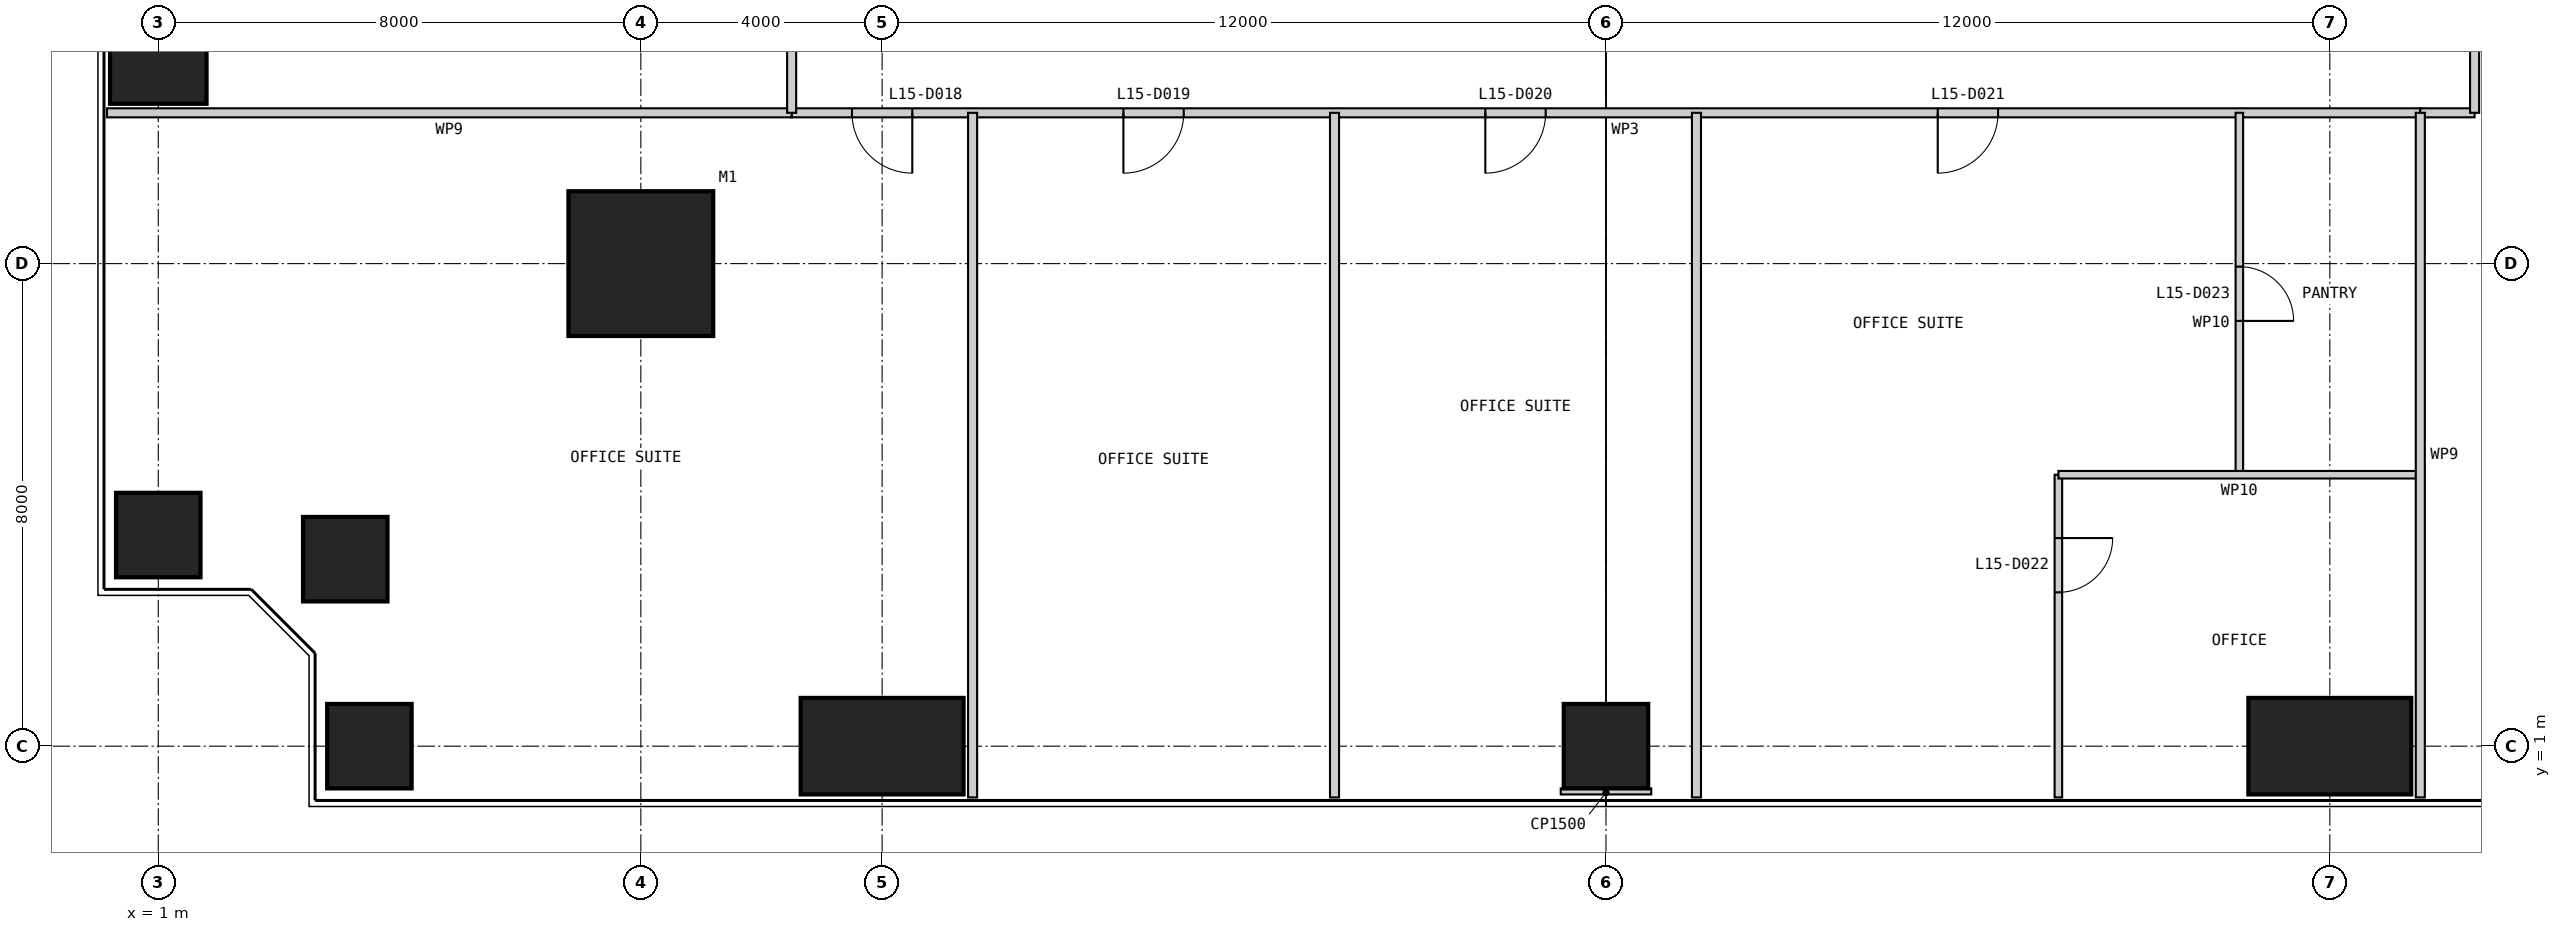
"""IFC4 building model, lengths in metres.
Left out: names, types, materials, properties, quantities, classifications, styles, units other than length and angle.
Written with IfcOpenShell. Run it as: python <this file> out.ifc"""

import sys

from ifc_helpers import new_model, si_unit, direction, frame, frame_2d, origin, origin_2d, place, context, subcontext, project, spatial, rectangle, extrude, element, fill, save


model = new_model("IFC4")
c1 = context("Model", 3, precision=1e-05, world=origin(), true_north=direction((0.0, 1.0)))
c2 = subcontext(c1, "Body", "Model", "MODEL_VIEW")
j1 = project(units=[si_unit("LENGTHUNIT", "METRE"), si_unit("PLANEANGLEUNIT", "RADIAN")], contexts=[c1])
p1 = place(None, origin())
s1 = spatial("IfcSite", under=j1, at=p1, CompositionType="ELEMENT")
p2 = place(p1, origin())
s2 = spatial("IfcBuilding", under=s1, at=p2, CompositionType="ELEMENT")
p3 = place(p2, frame((0.0, 0.0, 67.0)))
s3 = spatial("IfcBuildingStorey", under=s2, at=p3, CompositionType="ELEMENT", Elevation=67.0)
p4 = place(p3, frame((9.0, 9.0, 0.0), z_axis=(0.0, 0.0, 1.0), x_axis=(1.0, 0.0, 0.0)))
e1 = element("IfcColumn", 1, at=p4, inside=s3, PredefinedType="COLUMN", context=c2, shape_type="SweptSolid", body=[
    extrude(rectangle(XDim=2.4, YDim=2.4, at=origin_2d()), origin(), (0.0, 0.0, 1.0), 4.0),
])
p5 = place(p3, frame((4.5, 1.0, 0.0), z_axis=(0.0, 0.0, 1.0), x_axis=(1.0, 0.0, 0.0)))
e2 = element("IfcColumn", 2, at=p5, inside=s3, PredefinedType="COLUMN", context=c2, shape_type="SweptSolid", body=[
    extrude(rectangle(XDim=1.4, YDim=1.4, at=origin_2d()), origin(), (0.0, 0.0, 1.0), 4.0),
])
p6 = place(p3, frame((13.0, 1.0, 0.0), z_axis=(0.0, 0.0, 1.0), x_axis=(1.0, 0.0, 0.0)))
e3 = element("IfcColumn", 3, at=p6, inside=s3, PredefinedType="COLUMN", context=c2, shape_type="SweptSolid", body=[
    extrude(rectangle(XDim=2.7, YDim=1.6, at=origin_2d()), origin(), (0.0, 0.0, 1.0), 4.0),
])
p7 = place(p3, frame((25.0, 1.0, 0.0), z_axis=(0.0, 0.0, 1.0), x_axis=(1.0, 0.0, 0.0)))
e4 = element("IfcColumn", 4, at=p7, inside=s3, PredefinedType="COLUMN", context=c2, shape_type="SweptSolid", body=[
    extrude(rectangle(XDim=1.4, YDim=1.4, at=origin_2d()), origin(), (0.0, 0.0, 1.0), 4.0),
])
p8 = place(p3, frame((37.0, 1.0, 0.0), z_axis=(0.0, 0.0, 1.0), x_axis=(1.0, 0.0, 0.0)))
e5 = element("IfcColumn", 5, at=p8, inside=s3, PredefinedType="COLUMN", context=c2, shape_type="SweptSolid", body=[
    extrude(rectangle(XDim=2.7, YDim=1.6, at=origin_2d()), origin(), (0.0, 0.0, 1.0), 4.0),
])
p9 = place(p3, frame((1.0, 13.0, 0.0), z_axis=(0.0, 0.0, 1.0), x_axis=(1.0, 0.0, 0.0)))
e6 = element("IfcColumn", 6, at=p9, inside=s3, PredefinedType="COLUMN", context=c2, shape_type="SweptSolid", body=[
    extrude(rectangle(XDim=1.6, YDim=2.7, at=origin_2d()), origin(), (0.0, 0.0, 1.0), 4.0),
])
for number, where, z_axis, x_axis in (
    (7, (1.0, 4.5, 0.0), (0.0, 0.0, 1.0), (1.0, 0.0, 0.0)),
    (8, (4.1, 4.1, 0.0), (0.0, 0.0, 1.0), (1.0, 0.0, 0.0)),
):
    element("IfcColumn", number, at=place(p3, frame(where, z_axis=z_axis, x_axis=x_axis)), inside=s3, PredefinedType="COLUMN", context=c2, shape_type="SweptSolid", body=[
        extrude(rectangle(XDim=1.4, YDim=1.4, at=origin_2d()), origin(), (0.0, 0.0, 1.0), 4.0),
    ])
p10 = place(p3, frame((11.5, 11.5, 0.0), z_axis=(0.0, 0.0, 1.0), x_axis=(1.0, 0.0, 0.0)))
e9 = element("IfcWall", 9, at=p10, inside=s3, PredefinedType="PARTITIONING", context=c2, shape_type="SweptSolid", body=[
    extrude(rectangle(XDim=27.0, YDim=0.15, at=frame_2d((13.5, 0.0))), origin(), (0.0, 0.0, 1.0), 3.85),
])
p11 = place(p10, frame((1.0, 0.0, 0.0)))
e10 = element("IfcOpeningElement", 10, at=p11, cuts=e9, PredefinedType="OPENING", context=c2, shape_type="SweptSolid", body=[
    extrude(rectangle(XDim=1.0, YDim=2.2, at=frame_2d((0.5, 1.1))), frame((0.0, 0.085, 0.0), z_axis=(0.0, -1.0, 0.0), x_axis=(1.0, 0.0, 0.0)), (0.0, 0.0, 1.0), 0.17),
])
p12 = place(p10, frame((5.5, 0.0, 0.0)))
e11 = element("IfcOpeningElement", 11, at=p12, cuts=e9, PredefinedType="OPENING", context=c2, shape_type="SweptSolid", body=[
    extrude(rectangle(XDim=1.0, YDim=2.2, at=frame_2d((0.5, 1.1))), frame((0.0, 0.085, 0.0), z_axis=(0.0, -1.0, 0.0), x_axis=(1.0, 0.0, 0.0)), (0.0, 0.0, 1.0), 0.17),
])
p13 = place(p10, frame((11.5, 0.0, 0.0)))
e12 = element("IfcOpeningElement", 12, at=p13, cuts=e9, PredefinedType="OPENING", context=c2, shape_type="SweptSolid", body=[
    extrude(rectangle(XDim=1.0, YDim=2.2, at=frame_2d((0.5, 1.1))), frame((0.0, 0.085, 0.0), z_axis=(0.0, -1.0, 0.0), x_axis=(1.0, 0.0, 0.0)), (0.0, 0.0, 1.0), 0.17),
])
p14 = place(p10, frame((19.0, 0.0, 0.0)))
e13 = element("IfcOpeningElement", 13, at=p14, cuts=e9, PredefinedType="OPENING", context=c2, shape_type="SweptSolid", body=[
    extrude(rectangle(XDim=1.0, YDim=2.2, at=frame_2d((0.5, 1.1))), frame((0.0, 0.085, 0.0), z_axis=(0.0, -1.0, 0.0), x_axis=(1.0, 0.0, 0.0)), (0.0, 0.0, 1.0), 0.17),
])
for number, where, z_axis, x_axis in (
    (14, (0.15, 11.5, 0.0), (0.0, 0.0, 1.0), (1.0, 0.0, 0.0)),
    (15, (14.5, 0.15, 0.0), (0.0, 0.0, 1.0), (0.0, 1.0, 0.0)),
    (16, (20.5, 0.15, 0.0), (0.0, 0.0, 1.0), (0.0, 1.0, 0.0)),
    (17, (26.5, 0.15, 0.0), (0.0, 0.0, 1.0), (0.0, 1.0, 0.0)),
):
    element("IfcWall", number, at=place(p3, frame(where, z_axis=z_axis, x_axis=x_axis)), inside=s3, PredefinedType="PARTITIONING", context=c2, shape_type="SweptSolid", body=[
        extrude(rectangle(XDim=11.35, YDim=0.15, at=frame_2d((5.675, 0.0))), origin(), (0.0, 0.0, 1.0), 3.85),
    ])
p15 = place(p3, frame((32.5, 0.15, 0.0), z_axis=(0.0, 0.0, 1.0), x_axis=(0.0, 1.0, 0.0)))
e18 = element("IfcWall", 18, at=p15, inside=s3, PredefinedType="PARTITIONING", context=c2, shape_type="SweptSolid", body=[
    extrude(rectangle(XDim=5.35, YDim=0.125, at=frame_2d((2.675, 0.0))), origin(), (0.0, 0.0, 1.0), 3.85),
])
p16 = place(p15, frame((3.4, 0.0, 0.0)))
e19 = element("IfcOpeningElement", 19, at=p16, cuts=e18, PredefinedType="OPENING", context=c2, shape_type="SweptSolid", body=[
    extrude(rectangle(XDim=0.9, YDim=2.2, at=frame_2d((0.45, 1.1))), frame((0.0, 0.073, 0.0), z_axis=(0.0, -1.0, 0.0), x_axis=(1.0, 0.0, 0.0)), (0.0, 0.0, 1.0), 0.145),
])
p17 = place(p3, frame((35.5, 5.5, 0.0), z_axis=(0.0, 0.0, 1.0), x_axis=(0.0, 1.0, 0.0)))
e20 = element("IfcWall", 20, at=p17, inside=s3, PredefinedType="PARTITIONING", context=c2, shape_type="SweptSolid", body=[
    extrude(rectangle(XDim=6.0, YDim=0.125, at=frame_2d((3.0, 0.0))), origin(), (0.0, 0.0, 1.0), 3.85),
])
p18 = place(p17, frame((2.55, 0.0, 0.0)))
e21 = element("IfcOpeningElement", 21, at=p18, cuts=e20, PredefinedType="OPENING", context=c2, shape_type="SweptSolid", body=[
    extrude(rectangle(XDim=0.9, YDim=2.2, at=frame_2d((0.45, 1.1))), frame((0.0, 0.073, 0.0), z_axis=(0.0, -1.0, 0.0), x_axis=(1.0, 0.0, 0.0)), (0.0, 0.0, 1.0), 0.145),
])
p19 = place(p3, frame((32.5, 5.5, 0.0), z_axis=(0.0, 0.0, 1.0), x_axis=(1.0, 0.0, 0.0)))
e22 = element("IfcWall", 22, at=p19, inside=s3, PredefinedType="PARTITIONING", context=c2, shape_type="SweptSolid", body=[
    extrude(rectangle(XDim=6.0, YDim=0.125, at=frame_2d((3.0, 0.0))), origin(), (0.0, 0.0, 1.0), 3.85),
])
p20 = place(p3, frame((38.5, 11.5, 0.0), z_axis=(0.0, 0.0, 1.0), x_axis=(1.0, 0.0, 0.0)))
e23 = element("IfcWall", 23, at=p20, inside=s3, PredefinedType="PARTITIONING", context=c2, shape_type="SweptSolid", body=[
    extrude(rectangle(XDim=0.9, YDim=0.15, at=frame_2d((0.45, 0.0))), origin(), (0.0, 0.0, 1.0), 3.85),
])
p21 = place(p3, frame((39.4, 11.5, 0.0), z_axis=(0.0, 0.0, 1.0), x_axis=(0.0, 1.0, 0.0)))
e24 = element("IfcWall", 24, at=p21, inside=s3, PredefinedType="PARTITIONING", context=c2, shape_type="SweptSolid", body=[
    extrude(rectangle(XDim=27.9, YDim=0.15, at=frame_2d((13.95, 0.0))), origin(), (0.0, 0.0, 1.0), 3.85),
])
p22 = place(p21, frame((2.5, 0.0, 0.0)))
e25 = element("IfcOpeningElement", 25, at=p22, cuts=e24, PredefinedType="OPENING", context=c2, shape_type="SweptSolid", body=[
    extrude(rectangle(XDim=1.0, YDim=2.2, at=frame_2d((0.5, 1.1))), frame((0.0, 0.085, 0.0), z_axis=(0.0, -1.0, 0.0), x_axis=(1.0, 0.0, 0.0)), (0.0, 0.0, 1.0), 0.17),
])
p23 = place(p21, frame((9.25, 0.0, 0.0)))
e26 = element("IfcOpeningElement", 26, at=p23, cuts=e24, PredefinedType="OPENING", context=c2, shape_type="SweptSolid", body=[
    extrude(rectangle(XDim=1.0, YDim=2.2, at=frame_2d((0.5, 1.1))), frame((0.0, 0.085, 0.0), z_axis=(0.0, -1.0, 0.0), x_axis=(1.0, 0.0, 0.0)), (0.0, 0.0, 1.0), 0.17),
])
p24 = place(p21, frame((16.75, 0.0, 0.0)))
e27 = element("IfcOpeningElement", 27, at=p24, cuts=e24, PredefinedType="OPENING", context=c2, shape_type="SweptSolid", body=[
    extrude(rectangle(XDim=1.0, YDim=2.2, at=frame_2d((0.5, 1.1))), frame((0.0, 0.085, 0.0), z_axis=(0.0, -1.0, 0.0), x_axis=(1.0, 0.0, 0.0)), (0.0, 0.0, 1.0), 0.17),
])
p25 = place(p21, frame((23.5, 0.0, 0.0)))
e28 = element("IfcOpeningElement", 28, at=p25, cuts=e24, PredefinedType="OPENING", context=c2, shape_type="SweptSolid", body=[
    extrude(rectangle(XDim=1.0, YDim=2.2, at=frame_2d((0.5, 1.1))), frame((0.0, 0.085, 0.0), z_axis=(0.0, -1.0, 0.0), x_axis=(1.0, 0.0, 0.0)), (0.0, 0.0, 1.0), 0.17),
])
p26 = place(p3, frame((38.5, 0.15, 0.0), z_axis=(0.0, 0.0, 1.0), x_axis=(0.0, 1.0, 0.0)))
e29 = element("IfcWall", 29, at=p26, inside=s3, PredefinedType="PARTITIONING", context=c2, shape_type="SweptSolid", body=[
    extrude(rectangle(XDim=11.35, YDim=0.15, at=frame_2d((5.675, 0.0))), origin(), (0.0, 0.0, 1.0), 3.85),
])
p27 = place(p3, frame((11.5, 38.5, 0.0), z_axis=(0.0, 0.0, 1.0), x_axis=(0.0, -1.0, 0.0)))
e30 = element("IfcWall", 30, at=p27, inside=s3, PredefinedType="PARTITIONING", context=c2, shape_type="SweptSolid", body=[
    extrude(rectangle(XDim=27.0, YDim=0.15, at=frame_2d((13.5, 0.0))), origin(), (0.0, 0.0, 1.0), 3.85),
])
p28 = place(p27, frame((4.0, 0.0, 0.0)))
e31 = element("IfcOpeningElement", 31, at=p28, cuts=e30, PredefinedType="OPENING", context=c2, shape_type="SweptSolid", body=[
    extrude(rectangle(XDim=1.0, YDim=2.2, at=frame_2d((0.5, 1.1))), frame((0.0, 0.085, 0.0), z_axis=(0.0, -1.0, 0.0), x_axis=(1.0, 0.0, 0.0)), (0.0, 0.0, 1.0), 0.17),
])
p29 = place(p27, frame((10.0, 0.0, 0.0)))
e32 = element("IfcOpeningElement", 32, at=p29, cuts=e30, PredefinedType="OPENING", context=c2, shape_type="SweptSolid", body=[
    extrude(rectangle(XDim=1.0, YDim=2.2, at=frame_2d((0.5, 1.1))), frame((0.0, 0.085, 0.0), z_axis=(0.0, -1.0, 0.0), x_axis=(1.0, 0.0, 0.0)), (0.0, 0.0, 1.0), 0.17),
])
p30 = place(p27, frame((17.5, 0.0, 0.0)))
e33 = element("IfcOpeningElement", 33, at=p30, cuts=e30, PredefinedType="OPENING", context=c2, shape_type="SweptSolid", body=[
    extrude(rectangle(XDim=1.0, YDim=2.2, at=frame_2d((0.5, 1.1))), frame((0.0, 0.085, 0.0), z_axis=(0.0, -1.0, 0.0), x_axis=(1.0, 0.0, 0.0)), (0.0, 0.0, 1.0), 0.17),
])
p31 = place(p27, frame((23.5, 0.0, 0.0)))
e34 = element("IfcOpeningElement", 34, at=p31, cuts=e30, PredefinedType="OPENING", context=c2, shape_type="SweptSolid", body=[
    extrude(rectangle(XDim=1.0, YDim=2.2, at=frame_2d((0.5, 1.1))), frame((0.0, 0.085, 0.0), z_axis=(0.0, -1.0, 0.0), x_axis=(1.0, 0.0, 0.0)), (0.0, 0.0, 1.0), 0.17),
])
p32 = place(p3, frame((25.0, 0.2, 0.0), z_axis=(0.0, 0.0, 1.0), x_axis=(0.0, 1.0, 0.0)))
e35 = element("IfcWall", 35, at=p32, inside=s3, PredefinedType="PARTITIONING", context=c2, shape_type="SweptSolid", body=[
    extrude(rectangle(XDim=0.1, YDim=1.5, at=frame_2d((0.05, 0.0))), origin(), (0.0, 0.0, 1.0), 3.85),
])
p33 = place(p11, frame((1.0, 0.0, 0.0), z_axis=(0.0, 0.0, 1.0), x_axis=(-1.0, 0.0, 0.0)))
e36 = element("IfcDoor", 36, at=p33, inside=s3, OperationType="SINGLE_SWING_LEFT", PredefinedType="DOOR", context=c2, shape_type="SweptSolid", body=[
    extrude(rectangle(XDim=1.0, YDim=2.2, at=frame_2d((0.5, 1.1))), frame((0.0, 0.025, 0.0), z_axis=(0.0, -1.0, 0.0), x_axis=(1.0, 0.0, 0.0)), (0.0, 0.0, 1.0), 0.05),
])
fill(e10, e36)
p34 = place(p12, frame((1.0, 0.0, 0.0), z_axis=(0.0, 0.0, 1.0), x_axis=(-1.0, 0.0, 0.0)))
e37 = element("IfcDoor", 37, at=p34, inside=s3, OperationType="SINGLE_SWING_RIGHT", PredefinedType="DOOR", context=c2, shape_type="SweptSolid", body=[
    extrude(rectangle(XDim=1.0, YDim=2.2, at=frame_2d((0.5, 1.1))), frame((0.0, 0.025, 0.0), z_axis=(0.0, -1.0, 0.0), x_axis=(1.0, 0.0, 0.0)), (0.0, 0.0, 1.0), 0.05),
])
fill(e11, e37)
p35 = place(p13, frame((1.0, 0.0, 0.0), z_axis=(0.0, 0.0, 1.0), x_axis=(-1.0, 0.0, 0.0)))
e38 = element("IfcDoor", 38, at=p35, inside=s3, OperationType="SINGLE_SWING_RIGHT", PredefinedType="DOOR", context=c2, shape_type="SweptSolid", body=[
    extrude(rectangle(XDim=1.0, YDim=2.2, at=frame_2d((0.5, 1.1))), frame((0.0, 0.025, 0.0), z_axis=(0.0, -1.0, 0.0), x_axis=(1.0, 0.0, 0.0)), (0.0, 0.0, 1.0), 0.05),
])
fill(e12, e38)
p36 = place(p14, frame((1.0, 0.0, 0.0), z_axis=(0.0, 0.0, 1.0), x_axis=(-1.0, 0.0, 0.0)))
e39 = element("IfcDoor", 39, at=p36, inside=s3, OperationType="SINGLE_SWING_RIGHT", PredefinedType="DOOR", context=c2, shape_type="SweptSolid", body=[
    extrude(rectangle(XDim=1.0, YDim=2.2, at=frame_2d((0.5, 1.1))), frame((0.0, 0.025, 0.0), z_axis=(0.0, -1.0, 0.0), x_axis=(1.0, 0.0, 0.0)), (0.0, 0.0, 1.0), 0.05),
])
fill(e13, e39)
p37 = place(p16, frame((0.9, 0.0, 0.0), z_axis=(0.0, 0.0, 1.0), x_axis=(-1.0, 0.0, 0.0)))
e40 = element("IfcDoor", 40, at=p37, inside=s3, OperationType="SINGLE_SWING_LEFT", PredefinedType="DOOR", context=c2, shape_type="SweptSolid", body=[
    extrude(rectangle(XDim=0.9, YDim=2.2, at=frame_2d((0.45, 1.1))), frame((0.0, 0.025, 0.0), z_axis=(0.0, -1.0, 0.0), x_axis=(1.0, 0.0, 0.0)), (0.0, 0.0, 1.0), 0.05),
])
fill(e19, e40)
p38 = place(p18, frame((0.9, 0.0, 0.0), z_axis=(0.0, 0.0, 1.0), x_axis=(-1.0, 0.0, 0.0)))
e41 = element("IfcDoor", 41, at=p38, inside=s3, OperationType="SINGLE_SWING_RIGHT", PredefinedType="DOOR", context=c2, shape_type="SweptSolid", body=[
    extrude(rectangle(XDim=0.9, YDim=2.2, at=frame_2d((0.45, 1.1))), frame((0.0, 0.025, 0.0), z_axis=(0.0, -1.0, 0.0), x_axis=(1.0, 0.0, 0.0)), (0.0, 0.0, 1.0), 0.05),
])
fill(e21, e41)
save(model, sys.argv[1])
